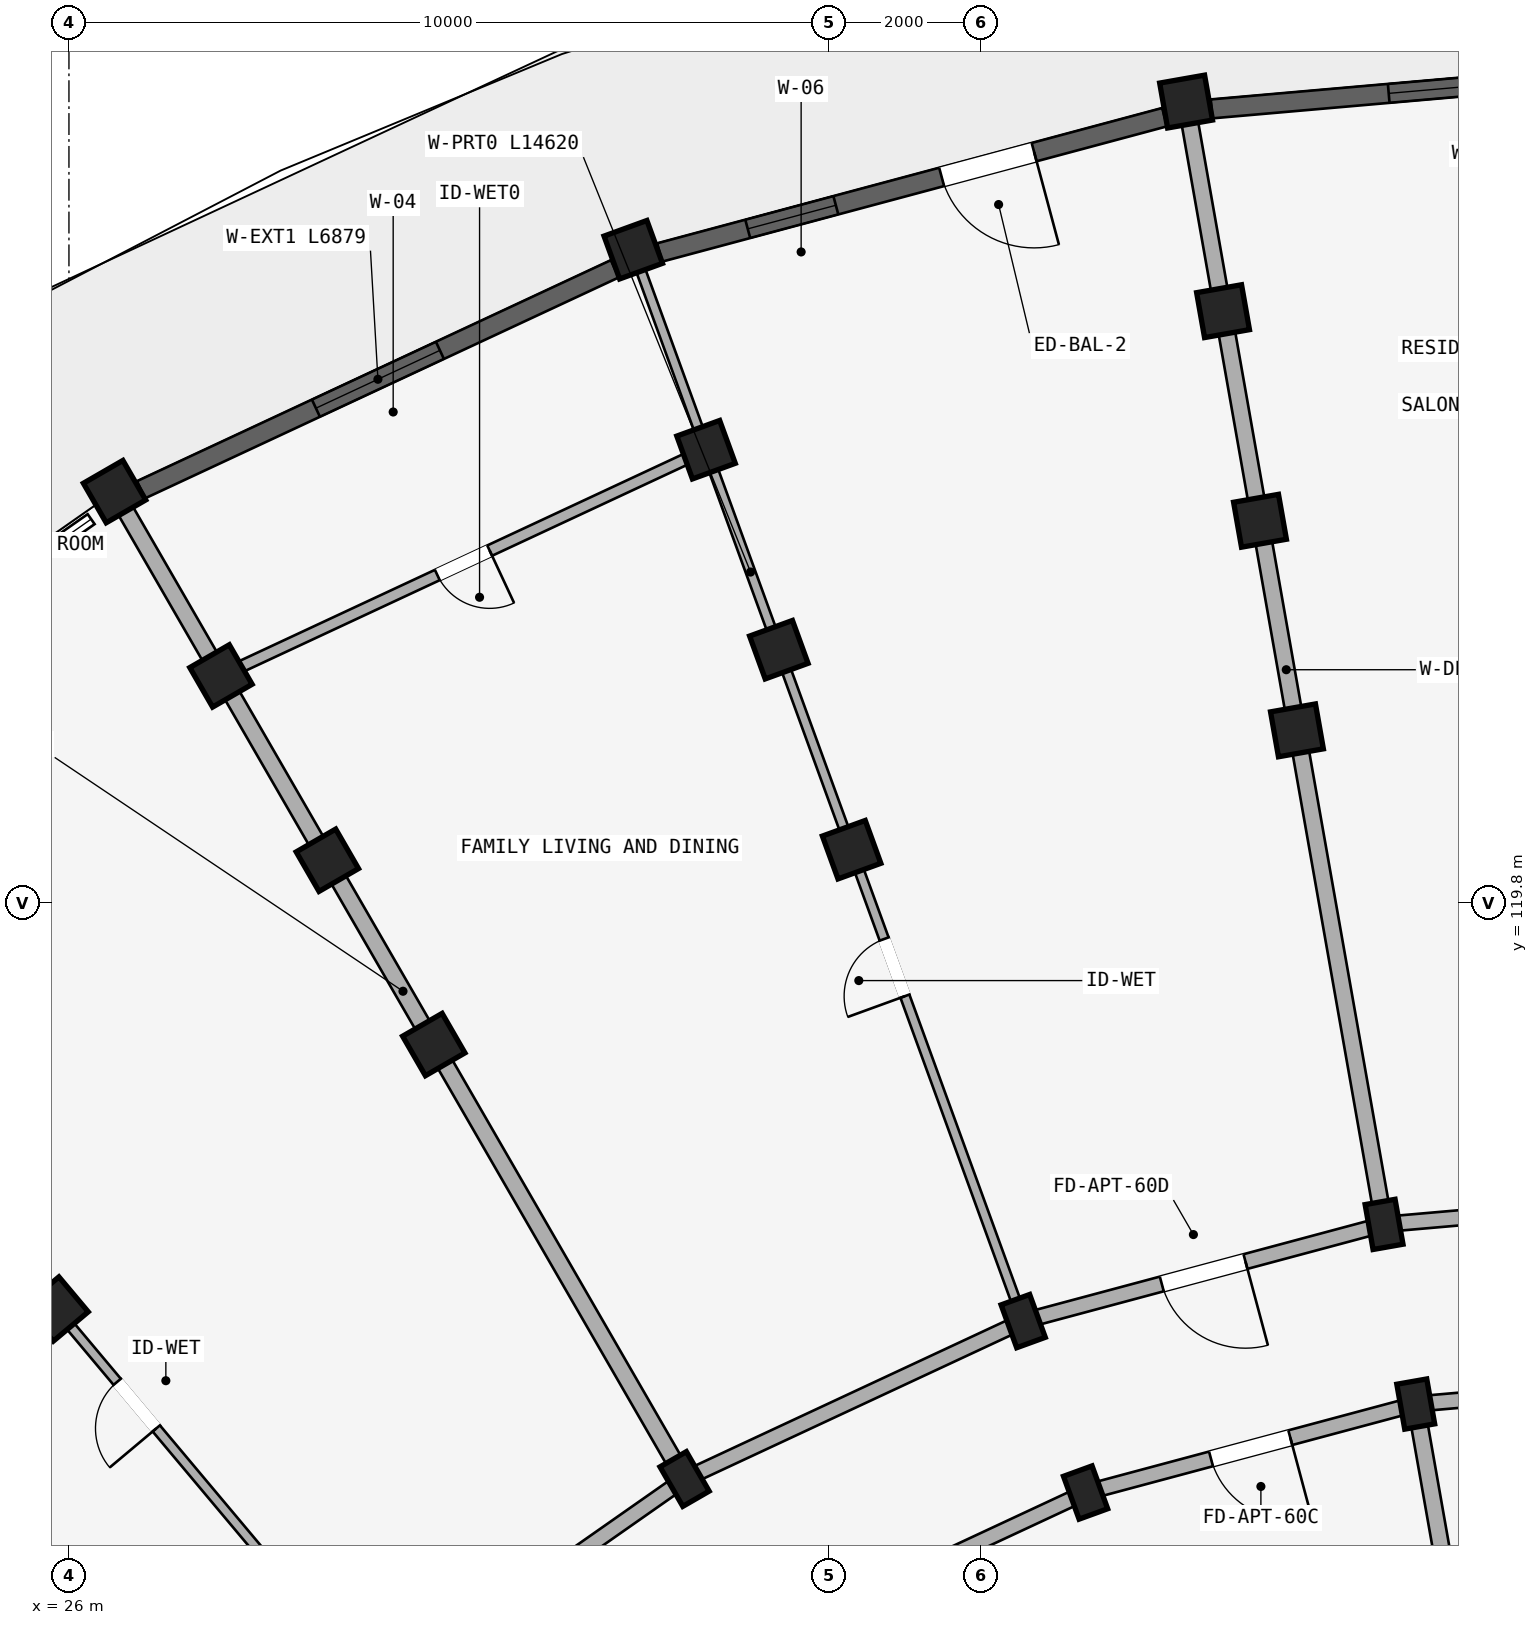
"""IFC4 building model, lengths in metres.
Left out: names, types, materials, properties, quantities, classifications, styles, units other than length and angle.
Written with IfcOpenShell. Run it as: python <this file> out.ifc"""

import sys

from ifc_helpers import new_model, si_unit, direction, frame, frame_2d, origin, origin_2d, place, context, subcontext, project, spatial, rectangle, extrude, element, fill, save


model = new_model("IFC4")
c1 = context("Model", 3, precision=1e-05, world=origin(), true_north=direction((0.0, 1.0)))
c2 = subcontext(c1, "Body", "Model", "MODEL_VIEW")
j1 = project(units=[si_unit("LENGTHUNIT", "METRE"), si_unit("PLANEANGLEUNIT", "RADIAN")], contexts=[c1])
p1 = place(None, origin())
s1 = spatial("IfcSite", under=j1, at=p1, CompositionType="ELEMENT")
p2 = place(p1, origin())
s2 = spatial("IfcBuilding", under=s1, at=p2, CompositionType="ELEMENT")
p3 = place(p2, frame((0.0, 0.0, 40.2)))
s3 = spatial("IfcBuildingStorey", under=s2, at=p3, CompositionType="ELEMENT", Elevation=40.2)
for number, where, z_axis, x_axis in (
    (1, (43.72, 113.208, 0.0), (0.0, 0.0, 1.0), (0.985, 0.174, 0.0)),
    (2, (43.303, 115.572, 0.0), (0.0, 0.0, 1.0), (0.985, 0.174, 0.0)),
):
    element("IfcColumn", number, at=place(p3, frame(where, z_axis=z_axis, x_axis=x_axis)), inside=s3, PredefinedType="COLUMN", context=c2, shape_type="SweptSolid", body=[
        extrude(rectangle(XDim=0.4, YDim=0.6, at=origin_2d()), origin(), (0.0, 0.0, 1.0), 2.93),
    ])
for number, where, z_axis, x_axis in (
    (3, (42.157, 122.071, 0.0), (0.0, 0.0, 1.0), (0.985, 0.174, 0.0)),
    (4, (41.671, 124.829, 0.0), (0.0, 0.0, 1.0), (0.985, 0.174, 0.0)),
    (5, (41.185, 127.586, 0.0), (0.0, 0.0, 1.0), (0.985, 0.174, 0.0)),
):
    element("IfcColumn", number, at=place(p3, frame(where, z_axis=z_axis, x_axis=x_axis)), inside=s3, PredefinedType="COLUMN", context=c2, shape_type="SweptSolid", body=[
        extrude(rectangle(XDim=0.6, YDim=0.6, at=origin_2d()), origin(), (0.0, 0.0, 1.0), 2.93),
    ])
p4 = place(p3, frame((40.698, 130.344, 0.0), z_axis=(0.0, 0.0, 1.0), x_axis=(0.984807753012, 0.173648177667, 0.0)))
e6 = element("IfcColumn", 6, at=p4, inside=s3, PredefinedType="COLUMN", context=c2, shape_type="SweptSolid", body=[
    extrude(rectangle(XDim=0.6, YDim=0.6, at=origin_2d()), origin(), (0.0, 0.0, 1.0), 2.97),
])
for number, where, z_axis, x_axis in (
    (7, (39.376, 112.044, 0.0), (0.0, 0.0, 1.0), (0.94, 0.342, 0.0)),
    (8, (38.555, 114.299, 0.0), (0.0, 0.0, 1.0), (0.94, 0.342, 0.0)),
):
    element("IfcColumn", number, at=place(p3, frame(where, z_axis=z_axis, x_axis=x_axis)), inside=s3, PredefinedType="COLUMN", context=c2, shape_type="SweptSolid", body=[
        extrude(rectangle(XDim=0.4, YDim=0.6, at=origin_2d()), origin(), (0.0, 0.0, 1.0), 2.93),
    ])
for number, where, z_axis, x_axis in (
    (9, (36.298, 120.501, 0.0), (0.0, 0.0, 1.0), (0.94, 0.342, 0.0)),
    (10, (35.34, 123.132, 0.0), (0.0, 0.0, 1.0), (0.94, 0.342, 0.0)),
    (11, (34.382, 125.764, 0.0), (0.0, 0.0, 1.0), (0.94, 0.342, 0.0)),
):
    element("IfcColumn", number, at=place(p3, frame(where, z_axis=z_axis, x_axis=x_axis)), inside=s3, PredefinedType="COLUMN", context=c2, shape_type="SweptSolid", body=[
        extrude(rectangle(XDim=0.6, YDim=0.6, at=origin_2d()), origin(), (0.0, 0.0, 1.0), 2.93),
    ])
p5 = place(p3, frame((33.425, 128.395, 0.0), z_axis=(0.0, 0.0, 1.0), x_axis=(0.939692620786, 0.342020143326, 0.0)))
e12 = element("IfcColumn", 12, at=p5, inside=s3, PredefinedType="COLUMN", context=c2, shape_type="SweptSolid", body=[
    extrude(rectangle(XDim=0.6, YDim=0.6, at=origin_2d()), origin(), (0.0, 0.0, 1.0), 2.97),
])
p6 = place(p3, frame((34.1, 112.222, 0.0), z_axis=(0.0, 0.0, 1.0), x_axis=(0.866025403784, 0.5, 0.0)))
e13 = element("IfcColumn", 13, at=p6, inside=s3, PredefinedType="COLUMN", context=c2, shape_type="SweptSolid", body=[
    extrude(rectangle(XDim=0.4, YDim=0.6, at=origin_2d()), origin(), (0.0, 0.0, 1.0), 2.93),
])
for number, where, z_axis, x_axis in (
    (14, (30.8, 117.938, 0.0), (0.0, 0.0, 1.0), (0.866, 0.5, 0.0)),
    (15, (29.4, 120.363, 0.0), (0.0, 0.0, 1.0), (0.866, 0.5, 0.0)),
    (16, (28.0, 122.787, 0.0), (0.0, 0.0, 1.0), (0.866, 0.5, 0.0)),
):
    element("IfcColumn", number, at=place(p3, frame(where, z_axis=z_axis, x_axis=x_axis)), inside=s3, PredefinedType="COLUMN", context=c2, shape_type="SweptSolid", body=[
        extrude(rectangle(XDim=0.6, YDim=0.6, at=origin_2d()), origin(), (0.0, 0.0, 1.0), 2.93),
    ])
p7 = place(p3, frame((26.6, 125.212, 0.0), z_axis=(0.0, 0.0, 1.0), x_axis=(0.866025403784, 0.5, 0.0)))
e17 = element("IfcColumn", 17, at=p7, inside=s3, PredefinedType="COLUMN", context=c2, shape_type="SweptSolid", body=[
    extrude(rectangle(XDim=0.6, YDim=0.6, at=origin_2d()), origin(), (0.0, 0.0, 1.0), 2.97),
])
p8 = place(p3, frame((25.831, 114.458, 0.0), z_axis=(0.0, 0.0, 1.0), x_axis=(0.766044443119, 0.642787609687, 0.0)))
e18 = element("IfcColumn", 18, at=p8, inside=s3, PredefinedType="COLUMN", context=c2, shape_type="SweptSolid", body=[
    extrude(rectangle(XDim=0.6, YDim=0.6, at=origin_2d()), origin(), (0.0, 0.0, 1.0), 2.93),
])
p9 = place(p3, frame((48.2, 113.6, 0.0), z_axis=(0.0, 0.0, 1.0), x_axis=(-0.996191949488, -0.087187153726, 0.0)))
e19 = element("IfcWall", 19, at=p9, inside=s3, PredefinedType="STANDARD", context=c2, shape_type="SweptSolid", body=[
    extrude(rectangle(XDim=4.497, YDim=0.2, at=frame_2d((2.249, 0.0))), origin(), (0.0, 0.0, 1.0), 2.372),
])
p10 = place(p9, frame((1.729, 0.0, 0.0)))
e20 = element("IfcOpeningElement", 20, at=p10, cuts=e19, PredefinedType="OPENING", context=c2, shape_type="SweptSolid", body=[
    extrude(rectangle(XDim=1.04, YDim=2.15, at=frame_2d((0.52, 1.075))), frame((0.0, 0.11, 0.0), z_axis=(0.0, -1.0, 0.0), x_axis=(1.0, 0.0, 0.0)), (0.0, 0.0, 1.0), 0.22),
])
p11 = place(p3, frame((48.2, 116.0, 0.0), z_axis=(0.0, 0.0, 1.0), x_axis=(-0.996193663584, -0.087167566415, 0.0)))
e21 = element("IfcWall", 21, at=p11, inside=s3, PredefinedType="STANDARD", context=c2, shape_type="SweptSolid", body=[
    extrude(rectangle(XDim=4.916, YDim=0.2, at=frame_2d((2.458, 0.0))), origin(), (0.0, 0.0, 1.0), 2.372),
])
p12 = place(p11, frame((1.918, 0.0, 0.0)))
e22 = element("IfcOpeningElement", 22, at=p12, cuts=e21, PredefinedType="OPENING", context=c2, shape_type="SweptSolid", body=[
    extrude(rectangle(XDim=1.08, YDim=2.15, at=frame_2d((0.54, 1.075))), frame((0.0, 0.11, 0.0), z_axis=(0.0, -1.0, 0.0), x_axis=(1.0, 0.0, 0.0)), (0.0, 0.0, 1.0), 0.22),
])
p13 = place(p3, frame((43.72, 113.208, 0.0), z_axis=(0.0, 0.0, 1.0), x_axis=(-0.965934240054, -0.258787642463, 0.0)))
e23 = element("IfcWall", 23, at=p13, inside=s3, PredefinedType="STANDARD", context=c2, shape_type="SweptSolid", body=[
    extrude(rectangle(XDim=4.497, YDim=0.2, at=frame_2d((2.249, 0.0))), origin(), (0.0, 0.0, 1.0), 2.372),
])
p14 = place(p13, frame((1.709, 0.0, 0.0)))
e24 = element("IfcOpeningElement", 24, at=p14, cuts=e23, PredefinedType="OPENING", context=c2, shape_type="SweptSolid", body=[
    extrude(rectangle(XDim=1.08, YDim=2.15, at=frame_2d((0.54, 1.075))), frame((0.0, 0.11, 0.0), z_axis=(0.0, -1.0, 0.0), x_axis=(1.0, 0.0, 0.0)), (0.0, 0.0, 1.0), 0.22),
])
p15 = place(p3, frame((43.303, 115.572, 0.0), z_axis=(0.0, 0.0, 1.0), x_axis=(-0.965930095386, -0.258803112091, 0.0)))
e25 = element("IfcWall", 25, at=p15, inside=s3, PredefinedType="STANDARD", context=c2, shape_type="SweptSolid", body=[
    extrude(rectangle(XDim=4.916, YDim=0.2, at=frame_2d((2.458, 0.0))), origin(), (0.0, 0.0, 1.0), 2.372),
])
p16 = place(p15, frame((1.888, 0.0, 0.0)))
e26 = element("IfcOpeningElement", 26, at=p16, cuts=e25, PredefinedType="OPENING", context=c2, shape_type="SweptSolid", body=[
    extrude(rectangle(XDim=1.14, YDim=2.15, at=frame_2d((0.57, 1.075))), frame((0.0, 0.11, 0.0), z_axis=(0.0, -1.0, 0.0), x_axis=(1.0, 0.0, 0.0)), (0.0, 0.0, 1.0), 0.22),
])
p17 = place(p3, frame((39.376, 112.044, 0.0), z_axis=(0.0, 0.0, 1.0), x_axis=(-0.906307919131, -0.422617978463, 0.0)))
e27 = element("IfcWall", 27, at=p17, inside=s3, PredefinedType="STANDARD", context=c2, shape_type="SweptSolid", body=[
    extrude(rectangle(XDim=4.497, YDim=0.2, at=frame_2d((2.249, 0.0))), origin(), (0.0, 0.0, 1.0), 2.372),
])
p18 = place(p3, frame((38.555, 114.299, 0.0), z_axis=(0.0, 0.0, 1.0), x_axis=(-0.906302381024, -0.422629854778, 0.0)))
e28 = element("IfcWall", 28, at=p18, inside=s3, PredefinedType="STANDARD", context=c2, shape_type="SweptSolid", body=[
    extrude(rectangle(XDim=4.915, YDim=0.2, at=frame_2d((2.458, 0.0))), origin(), (0.0, 0.0, 1.0), 2.372),
])
p19 = place(p3, frame((34.1, 112.222, 0.0), z_axis=(0.0, 0.0, 1.0), x_axis=(-0.819140911474, -0.573592335331, 0.0)))
e29 = element("IfcWall", 29, at=p19, inside=s3, PredefinedType="STANDARD", context=c2, shape_type="SweptSolid", body=[
    extrude(rectangle(XDim=4.916, YDim=0.2, at=frame_2d((2.458, 0.0))), origin(), (0.0, 0.0, 1.0), 2.372),
])
p20 = place(p19, frame((1.958, 0.0, 0.0)))
e30 = element("IfcOpeningElement", 30, at=p20, cuts=e29, PredefinedType="OPENING", context=c2, shape_type="SweptSolid", body=[
    extrude(rectangle(XDim=1.0, YDim=2.15, at=frame_2d((0.5, 1.075))), frame((0.0, 0.11, 0.0), z_axis=(0.0, -1.0, 0.0), x_axis=(1.0, 0.0, 0.0)), (0.0, 0.0, 1.0), 0.22),
])
p21 = place(p3, frame((44.901, 106.511, 0.0), z_axis=(0.0, 0.0, 1.0), x_axis=(-0.173647089161, 0.984807944945, 0.0)))
e31 = element("IfcWall", 31, at=p21, inside=s3, PredefinedType="STANDARD", context=c2, shape_type="SweptSolid", body=[
    extrude(rectangle(XDim=6.75, YDim=0.22, at=frame_2d((3.375, 0.0))), origin(), (0.0, 0.0, 1.0), 2.372),
])
p22 = place(p3, frame((43.286, 115.67, 0.0), z_axis=(0.0, 0.0, 1.0), x_axis=(-0.173639577162, 0.984809269474, 0.0)))
e32 = element("IfcWall", 32, at=p22, inside=s3, PredefinedType="STANDARD", context=c2, shape_type="SweptSolid", body=[
    extrude(rectangle(XDim=14.62, YDim=0.22, at=frame_2d((7.31, 0.0))), origin(), (0.0, 0.0, 1.0), 2.372),
])
p23 = place(p3, frame((38.521, 114.393, 0.0), z_axis=(0.0, 0.0, 1.0), x_axis=(-0.342015232663, 0.939694408106, 0.0)))
e33 = element("IfcWall", 33, at=p23, inside=s3, PredefinedType="PARTITIONING", context=c2, shape_type="SweptSolid", body=[
    extrude(rectangle(XDim=14.62, YDim=0.125, at=frame_2d((7.31, 0.0))), origin(), (0.0, 0.0, 1.0), 2.372),
])
p24 = place(p23, frame((4.449, 0.0, 0.0)))
e34 = element("IfcOpeningElement", 34, at=p24, cuts=e33, PredefinedType="OPENING", context=c2, shape_type="SweptSolid", body=[
    extrude(rectangle(XDim=0.8, YDim=2.1, at=frame_2d((0.4, 1.05))), frame((0.0, 0.073, 0.0), z_axis=(0.0, -1.0, 0.0), x_axis=(1.0, 0.0, 0.0)), (0.0, 0.0, 1.0), 0.145),
])
p25 = place(p3, frame((34.05, 112.309, 0.0), z_axis=(0.0, 0.0, 1.0), x_axis=(-0.500007702989, 0.866020956416, 0.0)))
e35 = element("IfcWall", 35, at=p25, inside=s3, PredefinedType="STANDARD", context=c2, shape_type="SweptSolid", body=[
    extrude(rectangle(XDim=14.62, YDim=0.22, at=frame_2d((7.31, 0.0))), origin(), (0.0, 0.0, 1.0), 2.372),
])
p26 = place(p3, frame((30.009, 109.479, 0.0), z_axis=(0.0, 0.0, 1.0), x_axis=(-0.642779216656, 0.76605148563, 0.0)))
e36 = element("IfcWall", 36, at=p26, inside=s3, PredefinedType="PARTITIONING", context=c2, shape_type="SweptSolid", body=[
    extrude(rectangle(XDim=14.62, YDim=0.125, at=frame_2d((7.31, 0.0))), origin(), (0.0, 0.0, 1.0), 2.372),
])
p27 = place(p26, frame((4.449, 0.0, 0.0)))
e37 = element("IfcOpeningElement", 37, at=p27, cuts=e36, PredefinedType="OPENING", context=c2, shape_type="SweptSolid", body=[
    extrude(rectangle(XDim=0.8, YDim=2.1, at=frame_2d((0.4, 1.05))), frame((0.0, 0.073, 0.0), z_axis=(0.0, -1.0, 0.0), x_axis=(1.0, 0.0, 0.0)), (0.0, 0.0, 1.0), 0.145),
])
p28 = place(p3, frame((26.521, 105.991, 0.0), z_axis=(0.0, 0.0, 1.0), x_axis=(-0.76605148563, 0.642779216656, 0.0)))
e38 = element("IfcWall", 38, at=p28, inside=s3, PredefinedType="STANDARD", context=c2, shape_type="SweptSolid", body=[
    extrude(rectangle(XDim=14.62, YDim=0.22, at=frame_2d((7.31, 0.0))), origin(), (0.0, 0.0, 1.0), 2.372),
])
p29 = place(p3, frame((34.382, 125.764, 0.0), z_axis=(0.0, 0.0, 1.0), x_axis=(-0.906297360311, -0.422640621205, 0.0)))
e39 = element("IfcWall", 39, at=p29, inside=s3, PredefinedType="PLUMBINGWALL", context=c2, shape_type="SweptSolid", body=[
    extrude(rectangle(XDim=7.042, YDim=0.15, at=frame_2d((3.521, 0.0))), origin(), (0.0, 0.0, 1.0), 2.372),
])
p30 = place(p29, frame((3.141, 0.0, 0.0)))
e40 = element("IfcOpeningElement", 40, at=p30, cuts=e39, PredefinedType="OPENING", context=c2, shape_type="SweptSolid", body=[
    extrude(rectangle(XDim=0.76, YDim=2.05, at=frame_2d((0.38, 1.025))), frame((0.0, 0.085, 0.0), z_axis=(0.0, -1.0, 0.0), x_axis=(1.0, 0.0, 0.0)), (0.0, 0.0, 1.0), 0.17),
])
p31 = place(p3, frame((47.886, 130.847, 0.0), z_axis=(0.0, 0.0, 1.0), x_axis=(-0.996193833065, -0.087165629485, 0.0)))
e41 = element("IfcWall", 41, at=p31, inside=s3, PredefinedType="STANDARD", context=c2, shape_type="SweptSolid", body=[
    extrude(rectangle(XDim=6.879, YDim=0.25, at=frame_2d((3.439, 0.0))), origin(), (0.0, 0.0, 1.0), 2.48),
])
p32 = place(p31, frame((2.34, 0.0, 0.38)))
e42 = element("IfcOpeningElement", 42, at=p32, cuts=e41, PredefinedType="OPENING", context=c2, shape_type="SweptSolid", body=[
    extrude(rectangle(XDim=2.2, YDim=1.9, at=frame_2d((1.1, 0.95))), frame((0.0, 0.135, 0.0), z_axis=(0.0, -1.0, 0.0), x_axis=(1.0, 0.0, 0.0)), (0.0, 0.0, 1.0), 0.27),
])
p33 = place(p3, frame((40.416, 130.139, 0.0), z_axis=(0.0, 0.0, 1.0), x_axis=(-0.965921436109, -0.258835428922, 0.0)))
e43 = element("IfcWall", 43, at=p33, inside=s3, PredefinedType="STANDARD", context=c2, shape_type="SweptSolid", body=[
    extrude(rectangle(XDim=6.879, YDim=0.25, at=frame_2d((3.439, 0.0))), origin(), (0.0, 0.0, 1.0), 2.48),
])
p34 = place(p33, frame((4.479, 0.0, 0.53)))
e44 = element("IfcOpeningElement", 44, at=p34, cuts=e43, PredefinedType="OPENING", context=c2, shape_type="SweptSolid", body=[
    extrude(rectangle(XDim=1.2, YDim=1.5, at=frame_2d((0.6, 0.75))), frame((0.0, 0.135, 0.0), z_axis=(0.0, -1.0, 0.0), x_axis=(1.0, 0.0, 0.0)), (0.0, 0.0, 1.0), 0.27),
])
p35 = place(p33, frame((1.778, 0.0, 0.0)))
e45 = element("IfcOpeningElement", 45, at=p35, cuts=e43, PredefinedType="OPENING", context=c2, shape_type="SweptSolid", body=[
    extrude(rectangle(XDim=1.26, YDim=2.15, at=frame_2d((0.63, 1.075))), frame((0.0, 0.135, 0.0), z_axis=(0.0, -1.0, 0.0), x_axis=(1.0, 0.0, 0.0)), (0.0, 0.0, 1.0), 0.27),
])
p36 = place(p3, frame((33.182, 128.144, 0.0), z_axis=(0.0, 0.0, 1.0), x_axis=(-0.906302789289, -0.422628979279, 0.0)))
e46 = element("IfcWall", 46, at=p36, inside=s3, PredefinedType="STANDARD", context=c2, shape_type="SweptSolid", body=[
    extrude(rectangle(XDim=6.879, YDim=0.25, at=frame_2d((3.439, 0.0))), origin(), (0.0, 0.0, 1.0), 2.48),
])
p37 = place(p36, frame((2.54, 0.0, 0.63)))
e47 = element("IfcOpeningElement", 47, at=p37, cuts=e46, PredefinedType="OPENING", context=c2, shape_type="SweptSolid", body=[
    extrude(rectangle(XDim=1.8, YDim=1.65, at=frame_2d((0.9, 0.825))), frame((0.0, 0.135, 0.0), z_axis=(0.0, -1.0, 0.0), x_axis=(1.0, 0.0, 0.0)), (0.0, 0.0, 1.0), 0.27),
])
p38 = place(p32, origin())
e48 = element("IfcWindow", 48, at=p38, inside=s3, PartitioningType="TRIPLE_PANEL_VERTICAL", PredefinedType="WINDOW", context=c2, shape_type="SweptSolid", body=[
    extrude(rectangle(XDim=2.2, YDim=1.9, at=frame_2d((1.1, 0.95))), frame((0.0, 0.03, 0.0), z_axis=(0.0, -1.0, 0.0), x_axis=(1.0, 0.0, 0.0)), (0.0, 0.0, 1.0), 0.06),
])
fill(e42, e48)
p39 = place(p34, origin())
e49 = element("IfcWindow", 49, at=p39, inside=s3, PartitioningType="SINGLE_PANEL", PredefinedType="WINDOW", context=c2, shape_type="SweptSolid", body=[
    extrude(rectangle(XDim=1.2, YDim=1.5, at=frame_2d((0.6, 0.75))), frame((0.0, 0.03, 0.0), z_axis=(0.0, -1.0, 0.0), x_axis=(1.0, 0.0, 0.0)), (0.0, 0.0, 1.0), 0.06),
])
fill(e44, e49)
p40 = place(p37, origin())
e50 = element("IfcWindow", 50, at=p40, inside=s3, PartitioningType="DOUBLE_PANEL_VERTICAL", PredefinedType="WINDOW", context=c2, shape_type="SweptSolid", body=[
    extrude(rectangle(XDim=1.8, YDim=1.65, at=frame_2d((0.9, 0.825))), frame((0.0, 0.03, 0.0), z_axis=(0.0, -1.0, 0.0), x_axis=(1.0, 0.0, 0.0)), (0.0, 0.0, 1.0), 0.06),
])
fill(e47, e50)
p41 = place(p24, frame((0.8, 0.0, 0.0), z_axis=(0.0, 0.0, 1.0), x_axis=(-1.0, 0.0, 0.0)))
e51 = element("IfcDoor", 51, at=p41, inside=s3, OperationType="SINGLE_SWING_RIGHT", PredefinedType="DOOR", context=c2, shape_type="SweptSolid", body=[
    extrude(rectangle(XDim=0.8, YDim=2.1, at=frame_2d((0.4, 1.05))), frame((0.0, 0.025, 0.0), z_axis=(0.0, -1.0, 0.0), x_axis=(1.0, 0.0, 0.0)), (0.0, 0.0, 1.0), 0.05),
])
fill(e34, e51)
p42 = place(p27, origin())
e52 = element("IfcDoor", 52, at=p42, inside=s3, OperationType="SINGLE_SWING_LEFT", PredefinedType="DOOR", context=c2, shape_type="SweptSolid", body=[
    extrude(rectangle(XDim=0.8, YDim=2.1, at=frame_2d((0.4, 1.05))), frame((0.0, 0.025, 0.0), z_axis=(0.0, -1.0, 0.0), x_axis=(1.0, 0.0, 0.0)), (0.0, 0.0, 1.0), 0.05),
])
fill(e37, e52)
p43 = place(p16, origin())
e53 = element("IfcDoor", 53, at=p43, inside=s3, OperationType="SINGLE_SWING_LEFT", PredefinedType="DOOR", context=c2, shape_type="SweptSolid", body=[
    extrude(rectangle(XDim=1.14, YDim=2.15, at=frame_2d((0.57, 1.075))), frame((0.0, 0.025, 0.0), z_axis=(0.0, -1.0, 0.0), x_axis=(1.0, 0.0, 0.0)), (0.0, 0.0, 1.0), 0.05),
])
fill(e26, e53)
p44 = place(p30, frame((0.76, 0.0, 0.0), z_axis=(0.0, 0.0, 1.0), x_axis=(-1.0, 0.0, 0.0)))
e54 = element("IfcDoor", 54, at=p44, inside=s3, OperationType="SINGLE_SWING_RIGHT", PredefinedType="DOOR", context=c2, shape_type="SweptSolid", body=[
    extrude(rectangle(XDim=0.76, YDim=2.05, at=frame_2d((0.38, 1.025))), frame((0.0, 0.025, 0.0), z_axis=(0.0, -1.0, 0.0), x_axis=(1.0, 0.0, 0.0)), (0.0, 0.0, 1.0), 0.05),
])
fill(e40, e54)
p45 = place(p14, frame((1.08, 0.0, 0.0), z_axis=(0.0, 0.0, 1.0), x_axis=(-1.0, 0.0, 0.0)))
e55 = element("IfcDoor", 55, at=p45, inside=s3, OperationType="SINGLE_SWING_RIGHT", PredefinedType="DOOR", context=c2, shape_type="SweptSolid", body=[
    extrude(rectangle(XDim=1.08, YDim=2.15, at=frame_2d((0.54, 1.075))), frame((0.0, 0.025, 0.0), z_axis=(0.0, -1.0, 0.0), x_axis=(1.0, 0.0, 0.0)), (0.0, 0.0, 1.0), 0.05),
])
fill(e24, e55)
p46 = place(p35, frame((1.26, 0.0, 0.0), z_axis=(0.0, 0.0, 1.0), x_axis=(-1.0, 0.0, 0.0)))
e56 = element("IfcDoor", 56, at=p46, inside=s3, OperationType="SINGLE_SWING_RIGHT", PredefinedType="DOOR", context=c2, shape_type="SweptSolid", body=[
    extrude(rectangle(XDim=1.26, YDim=2.15, at=frame_2d((0.63, 1.075))), frame((0.0, 0.025, 0.0), z_axis=(0.0, -1.0, 0.0), x_axis=(1.0, 0.0, 0.0)), (0.0, 0.0, 1.0), 0.05),
])
fill(e45, e56)
save(model, sys.argv[1])
